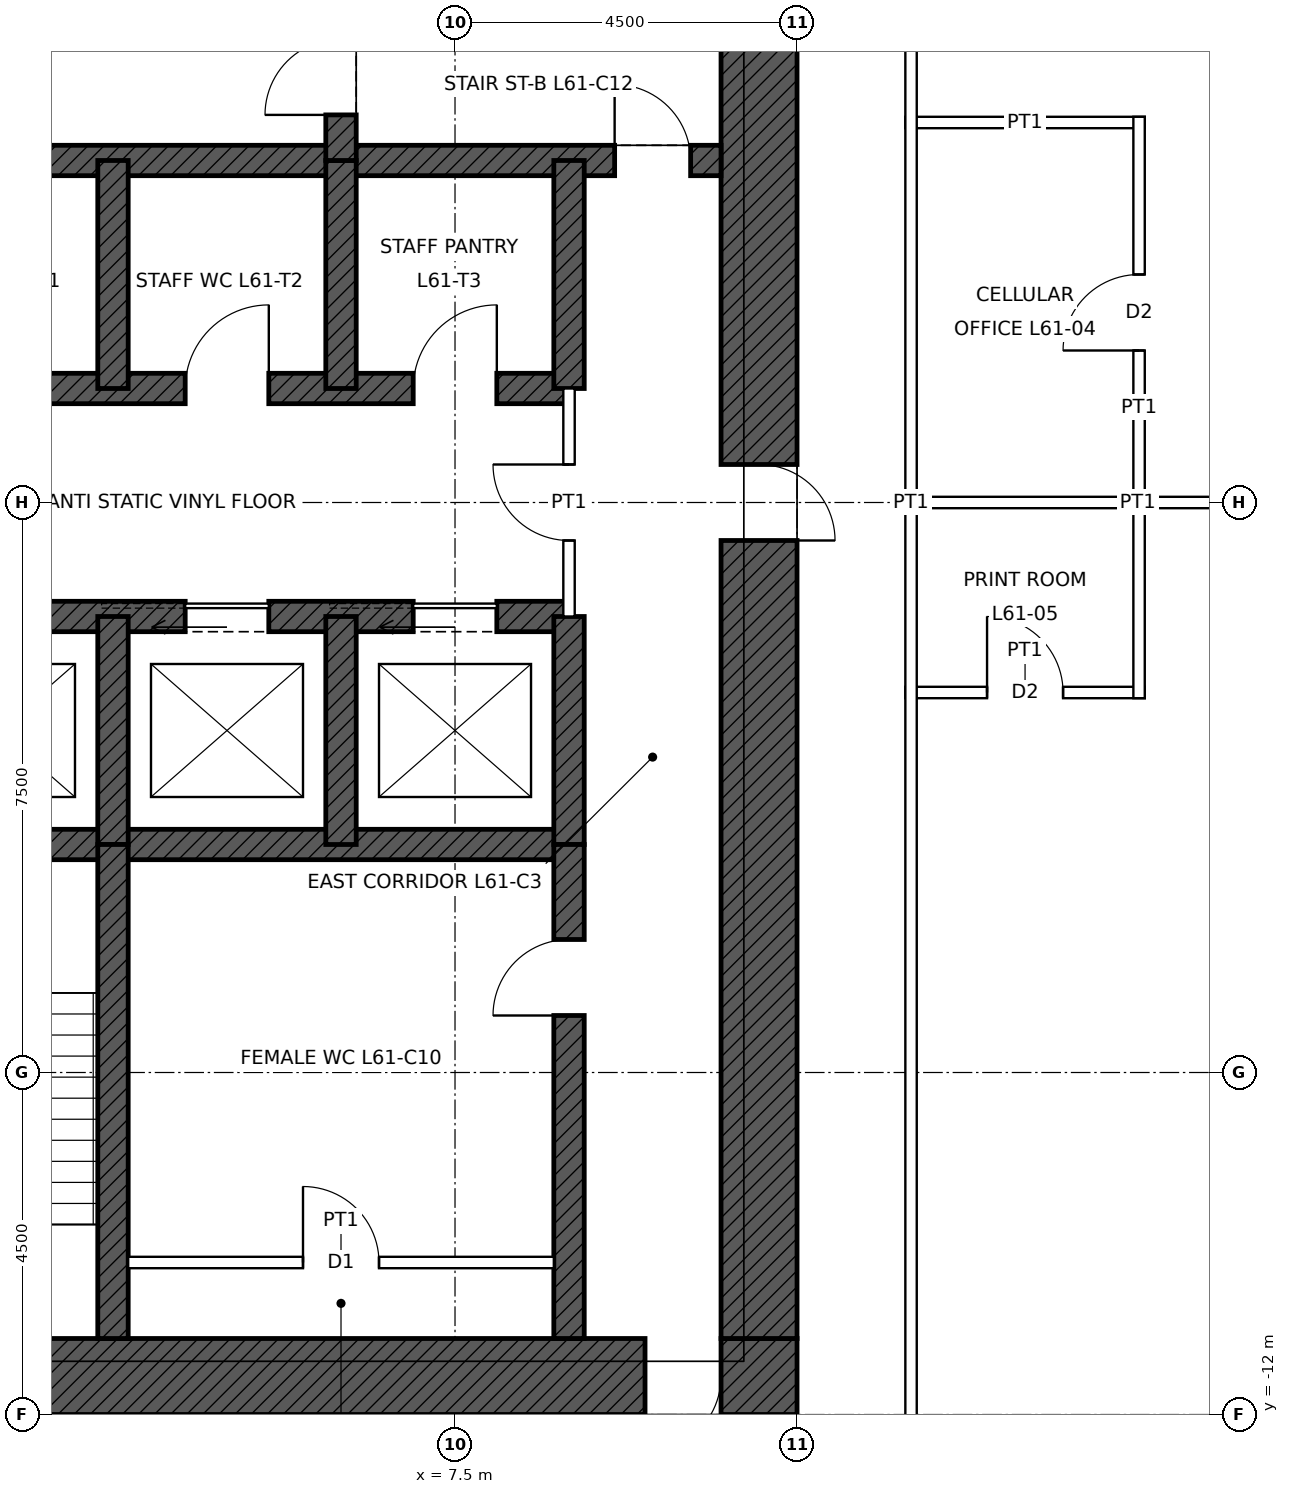
"""IFC4 building model, lengths in metres.
Left out: names, types, materials, properties, quantities, classifications, styles, units other than length and angle.
Written with IfcOpenShell. Run it as: python <this file> out.ifc"""

import sys

from ifc_helpers import new_model, si_unit, direction, frame, frame_2d, origin, place, context, subcontext, project, spatial, rectangle, extrude, element, fill, save


model = new_model("IFC4")
c1 = context("Model", 3, precision=1e-05, world=origin(), true_north=direction((0.0, 1.0)))
c2 = subcontext(c1, "Body", "Model", "MODEL_VIEW")
j1 = project(units=[si_unit("LENGTHUNIT", "METRE"), si_unit("PLANEANGLEUNIT", "RADIAN")], contexts=[c1])
p1 = place(None, origin())
s1 = spatial("IfcSite", under=j1, at=p1, CompositionType="ELEMENT")
p2 = place(p1, origin())
s2 = spatial("IfcBuilding", under=s1, at=p2, CompositionType="ELEMENT")
p3 = place(p2, frame((0.0, 0.0, 279.9)))
s3 = spatial("IfcBuildingStorey", under=s2, at=p3, CompositionType="ELEMENT", Elevation=279.9)
p4 = place(p3, frame((12.0, -11.5, 0.0), z_axis=(0.0, 0.0, 1.0), x_axis=(-1.0, 0.0, 0.0)))
e1 = element("IfcWall", 1, at=p4, inside=s3, PredefinedType="SHEAR", context=c2, shape_type="SweptSolid", body=[
    extrude(rectangle(XDim=24.0, YDim=1.0, at=frame_2d((12.0, 0.0))), origin(), (0.0, 0.0, 1.0), 4.0),
])
p5 = place(p4, frame((11.5, 0.0, 0.0)))
e2 = element("IfcOpeningElement", 2, at=p5, cuts=e1, PredefinedType="OPENING", context=c2, shape_type="SweptSolid", body=[
    extrude(rectangle(XDim=1.0, YDim=2.1, at=frame_2d((0.5, 1.05))), frame((0.0, 0.51, 0.0), z_axis=(0.0, -1.0, 0.0), x_axis=(1.0, 0.0, 0.0)), (0.0, 0.0, 1.0), 1.02),
])
p6 = place(p4, frame((1.0, 0.0, 0.0)))
e3 = element("IfcOpeningElement", 3, at=p6, cuts=e1, PredefinedType="OPENING", context=c2, shape_type="SweptSolid", body=[
    extrude(rectangle(XDim=1.0, YDim=2.4, at=frame_2d((0.5, 1.2))), frame((0.0, 0.51, 0.0), z_axis=(0.0, -1.0, 0.0), x_axis=(1.0, 0.0, 0.0)), (0.0, 0.0, 1.0), 1.02),
])
p7 = place(p3, frame((11.5, 11.0, 0.0), z_axis=(0.0, 0.0, 1.0), x_axis=(0.0, -1.0, 0.0)))
e4 = element("IfcWall", 4, at=p7, inside=s3, PredefinedType="SHEAR", context=c2, shape_type="SweptSolid", body=[
    extrude(rectangle(XDim=22.0, YDim=1.0, at=frame_2d((11.0, 0.0))), origin(), (0.0, 0.0, 1.0), 4.0),
])
p8 = place(p7, frame((10.5, 0.0, 0.0)))
e5 = element("IfcOpeningElement", 5, at=p8, cuts=e4, PredefinedType="OPENING", context=c2, shape_type="SweptSolid", body=[
    extrude(rectangle(XDim=1.0, YDim=2.4, at=frame_2d((0.5, 1.2))), frame((0.0, 0.51, 0.0), z_axis=(0.0, -1.0, 0.0), x_axis=(1.0, 0.0, 0.0)), (0.0, 0.0, 1.0), 1.02),
])
p9 = place(p3, frame((-11.0, 4.5, 0.0), z_axis=(0.0, 0.0, 1.0), x_axis=(1.0, 0.0, 0.0)))
e6 = element("IfcWall", 6, at=p9, inside=s3, PredefinedType="SHEAR", context=c2, shape_type="SweptSolid", body=[
    extrude(rectangle(XDim=22.0, YDim=0.4, at=frame_2d((11.0, 0.0))), origin(), (0.0, 0.0, 1.0), 4.0),
])
p10 = place(p9, frame((0.4, 0.0, 0.0)))
e7 = element("IfcOpeningElement", 7, at=p10, cuts=e6, PredefinedType="OPENING", context=c2, shape_type="SweptSolid", body=[
    extrude(rectangle(XDim=1.0, YDim=2.1, at=frame_2d((0.5, 1.05))), frame((0.0, 0.21, 0.0), z_axis=(0.0, -1.0, 0.0), x_axis=(1.0, 0.0, 0.0)), (0.0, 0.0, 1.0), 0.42),
])
p11 = place(p9, frame((20.6, 0.0, 0.0)))
e8 = element("IfcOpeningElement", 8, at=p11, cuts=e6, PredefinedType="OPENING", context=c2, shape_type="SweptSolid", body=[
    extrude(rectangle(XDim=1.0, YDim=2.1, at=frame_2d((0.5, 1.05))), frame((0.0, 0.21, 0.0), z_axis=(0.0, -1.0, 0.0), x_axis=(1.0, 0.0, 0.0)), (0.0, 0.0, 1.0), 0.42),
])
p12 = place(p3, frame((-9.0, 1.5, 0.0), z_axis=(0.0, 0.0, 1.0), x_axis=(1.0, 0.0, 0.0)))
e9 = element("IfcWall", 9, at=p12, inside=s3, PredefinedType="SHEAR", context=c2, shape_type="SweptSolid", body=[
    extrude(rectangle(XDim=18.0, YDim=0.4, at=frame_2d((9.0, 0.0))), origin(), (0.0, 0.0, 1.0), 4.0),
])
p13 = place(p12, frame((0.95, 0.0, 0.0)))
e10 = element("IfcOpeningElement", 10, at=p13, cuts=e9, PredefinedType="OPENING", context=c2, shape_type="SweptSolid", body=[
    extrude(rectangle(XDim=1.1, YDim=2.1, at=frame_2d((0.55, 1.05))), frame((0.0, 0.21, 0.0), z_axis=(0.0, -1.0, 0.0), x_axis=(1.0, 0.0, 0.0)), (0.0, 0.0, 1.0), 0.42),
])
p14 = place(p12, frame((3.95, 0.0, 0.0)))
e11 = element("IfcOpeningElement", 11, at=p14, cuts=e9, PredefinedType="OPENING", context=c2, shape_type="SweptSolid", body=[
    extrude(rectangle(XDim=1.1, YDim=2.1, at=frame_2d((0.55, 1.05))), frame((0.0, 0.21, 0.0), z_axis=(0.0, -1.0, 0.0), x_axis=(1.0, 0.0, 0.0)), (0.0, 0.0, 1.0), 0.42),
])
p15 = place(p12, frame((6.95, 0.0, 0.0)))
e12 = element("IfcOpeningElement", 12, at=p15, cuts=e9, PredefinedType="OPENING", context=c2, shape_type="SweptSolid", body=[
    extrude(rectangle(XDim=1.1, YDim=2.1, at=frame_2d((0.55, 1.05))), frame((0.0, 0.21, 0.0), z_axis=(0.0, -1.0, 0.0), x_axis=(1.0, 0.0, 0.0)), (0.0, 0.0, 1.0), 0.42),
])
p16 = place(p12, frame((9.95, 0.0, 0.0)))
e13 = element("IfcOpeningElement", 13, at=p16, cuts=e9, PredefinedType="OPENING", context=c2, shape_type="SweptSolid", body=[
    extrude(rectangle(XDim=1.1, YDim=2.1, at=frame_2d((0.55, 1.05))), frame((0.0, 0.21, 0.0), z_axis=(0.0, -1.0, 0.0), x_axis=(1.0, 0.0, 0.0)), (0.0, 0.0, 1.0), 0.42),
])
p17 = place(p12, frame((12.95, 0.0, 0.0)))
e14 = element("IfcOpeningElement", 14, at=p17, cuts=e9, PredefinedType="OPENING", context=c2, shape_type="SweptSolid", body=[
    extrude(rectangle(XDim=1.1, YDim=2.1, at=frame_2d((0.55, 1.05))), frame((0.0, 0.21, 0.0), z_axis=(0.0, -1.0, 0.0), x_axis=(1.0, 0.0, 0.0)), (0.0, 0.0, 1.0), 0.42),
])
p18 = place(p12, frame((15.95, 0.0, 0.0)))
e15 = element("IfcOpeningElement", 15, at=p18, cuts=e9, PredefinedType="OPENING", context=c2, shape_type="SweptSolid", body=[
    extrude(rectangle(XDim=1.1, YDim=2.1, at=frame_2d((0.55, 1.05))), frame((0.0, 0.21, 0.0), z_axis=(0.0, -1.0, 0.0), x_axis=(1.0, 0.0, 0.0)), (0.0, 0.0, 1.0), 0.42),
])
p19 = place(p3, frame((-9.0, -1.5, 0.0), z_axis=(0.0, 0.0, 1.0), x_axis=(1.0, 0.0, 0.0)))
e16 = element("IfcWall", 16, at=p19, inside=s3, PredefinedType="SHEAR", context=c2, shape_type="SweptSolid", body=[
    extrude(rectangle(XDim=18.0, YDim=0.4, at=frame_2d((9.0, 0.0))), origin(), (0.0, 0.0, 1.0), 4.0),
])
p20 = place(p19, frame((9.95, 0.0, 0.0)))
e17 = element("IfcOpeningElement", 17, at=p20, cuts=e16, PredefinedType="OPENING", context=c2, shape_type="SweptSolid", body=[
    extrude(rectangle(XDim=1.1, YDim=2.1, at=frame_2d((0.55, 1.05))), frame((0.0, 0.21, 0.0), z_axis=(0.0, -1.0, 0.0), x_axis=(1.0, 0.0, 0.0)), (0.0, 0.0, 1.0), 0.42),
])
p21 = place(p19, frame((12.95, 0.0, 0.0)))
e18 = element("IfcOpeningElement", 18, at=p21, cuts=e16, PredefinedType="OPENING", context=c2, shape_type="SweptSolid", body=[
    extrude(rectangle(XDim=1.1, YDim=2.1, at=frame_2d((0.55, 1.05))), frame((0.0, 0.21, 0.0), z_axis=(0.0, -1.0, 0.0), x_axis=(1.0, 0.0, 0.0)), (0.0, 0.0, 1.0), 0.42),
])
p22 = place(p19, frame((15.95, 0.0, 0.0)))
e19 = element("IfcOpeningElement", 19, at=p22, cuts=e16, PredefinedType="OPENING", context=c2, shape_type="SweptSolid", body=[
    extrude(rectangle(XDim=1.1, YDim=2.1, at=frame_2d((0.55, 1.05))), frame((0.0, 0.21, 0.0), z_axis=(0.0, -1.0, 0.0), x_axis=(1.0, 0.0, 0.0)), (0.0, 0.0, 1.0), 0.42),
])
p23 = place(p19, frame((0.95, 0.0, 0.0)))
e20 = element("IfcOpeningElement", 20, at=p23, cuts=e16, PredefinedType="OPENING", context=c2, shape_type="SweptSolid", body=[
    extrude(rectangle(XDim=1.1, YDim=2.1, at=frame_2d((0.55, 1.05))), frame((0.0, 0.21, 0.0), z_axis=(0.0, -1.0, 0.0), x_axis=(1.0, 0.0, 0.0)), (0.0, 0.0, 1.0), 0.42),
])
p24 = place(p19, frame((3.95, 0.0, 0.0)))
e21 = element("IfcOpeningElement", 21, at=p24, cuts=e16, PredefinedType="OPENING", context=c2, shape_type="SweptSolid", body=[
    extrude(rectangle(XDim=1.1, YDim=2.1, at=frame_2d((0.55, 1.05))), frame((0.0, 0.21, 0.0), z_axis=(0.0, -1.0, 0.0), x_axis=(1.0, 0.0, 0.0)), (0.0, 0.0, 1.0), 0.42),
])
p25 = place(p19, frame((6.95, 0.0, 0.0)))
e22 = element("IfcOpeningElement", 22, at=p25, cuts=e16, PredefinedType="OPENING", context=c2, shape_type="SweptSolid", body=[
    extrude(rectangle(XDim=1.1, YDim=2.1, at=frame_2d((0.55, 1.05))), frame((0.0, 0.21, 0.0), z_axis=(0.0, -1.0, 0.0), x_axis=(1.0, 0.0, 0.0)), (0.0, 0.0, 1.0), 0.42),
])
p26 = place(p3, frame((-9.0, -4.5, 0.0), z_axis=(0.0, 0.0, 1.0), x_axis=(1.0, 0.0, 0.0)))
e23 = element("IfcWall", 23, at=p26, inside=s3, PredefinedType="SHEAR", context=c2, shape_type="SweptSolid", body=[
    extrude(rectangle(XDim=18.0, YDim=0.4, at=frame_2d((9.0, 0.0))), origin(), (0.0, 0.0, 1.0), 4.0),
])
for number, where, z_axis, x_axis in (
    (24, (9.0, 1.5, 0.0), (0.0, 0.0, 1.0), (0.0, 1.0, 0.0)),
    (25, (9.0, -4.5, 0.0), (0.0, 0.0, 1.0), (0.0, 1.0, 0.0)),
    (26, (3.0, 1.5, 0.0), (0.0, 0.0, 1.0), (0.0, 1.0, 0.0)),
    (27, (6.0, 1.5, 0.0), (0.0, 0.0, 1.0), (0.0, 1.0, 0.0)),
    (28, (3.0, -4.5, 0.0), (0.0, 0.0, 1.0), (0.0, 1.0, 0.0)),
    (29, (6.0, -4.5, 0.0), (0.0, 0.0, 1.0), (0.0, 1.0, 0.0)),
):
    element("IfcWall", number, at=place(p3, frame(where, z_axis=z_axis, x_axis=x_axis)), inside=s3, PredefinedType="SHEAR", context=c2, shape_type="SweptSolid", body=[
        extrude(rectangle(XDim=3.0, YDim=0.4, at=frame_2d((1.5, 0.0))), origin(), (0.0, 0.0, 1.0), 4.0),
    ])
p27 = place(p3, frame((6.0, 4.5, 0.0), z_axis=(0.0, 0.0, 1.0), x_axis=(0.0, 1.0, 0.0)))
e30 = element("IfcWall", 30, at=p27, inside=s3, PredefinedType="SHEAR", context=c2, shape_type="SweptSolid", body=[
    extrude(rectangle(XDim=6.5, YDim=0.4, at=frame_2d((3.25, 0.0))), origin(), (0.0, 0.0, 1.0), 4.0),
])
p28 = place(p27, frame((0.6, 0.0, 0.0)))
e31 = element("IfcOpeningElement", 31, at=p28, cuts=e30, PredefinedType="OPENING", context=c2, shape_type="SweptSolid", body=[
    extrude(rectangle(XDim=1.0, YDim=2.1, at=frame_2d((0.5, 1.05))), frame((0.0, 0.21, 0.0), z_axis=(0.0, -1.0, 0.0), x_axis=(1.0, 0.0, 0.0)), (0.0, 0.0, 1.0), 0.42),
])
p29 = place(p3, frame((9.0, -11.0, 0.0), z_axis=(0.0, 0.0, 1.0), x_axis=(0.0, 1.0, 0.0)))
e32 = element("IfcWall", 32, at=p29, inside=s3, PredefinedType="SHEAR", context=c2, shape_type="SweptSolid", body=[
    extrude(rectangle(XDim=6.5, YDim=0.4, at=frame_2d((3.25, 0.0))), origin(), (0.0, 0.0, 1.0), 4.0),
])
p30 = place(p29, frame((4.25, 0.0, 0.0)))
e33 = element("IfcOpeningElement", 33, at=p30, cuts=e32, PredefinedType="OPENING", context=c2, shape_type="SweptSolid", body=[
    extrude(rectangle(XDim=1.0, YDim=2.1, at=frame_2d((0.5, 1.05))), frame((0.0, 0.21, 0.0), z_axis=(0.0, -1.0, 0.0), x_axis=(1.0, 0.0, 0.0)), (0.0, 0.0, 1.0), 0.42),
])
p31 = place(p3, frame((3.0, -11.0, 0.0), z_axis=(0.0, 0.0, 1.0), x_axis=(0.0, 1.0, 0.0)))
e34 = element("IfcWall", 34, at=p31, inside=s3, PredefinedType="SHEAR", context=c2, shape_type="SweptSolid", body=[
    extrude(rectangle(XDim=6.5, YDim=0.4, at=frame_2d((3.25, 0.0))), origin(), (0.0, 0.0, 1.0), 4.0),
])
p32 = place(p3, frame((13.425, -2.5, 0.0), z_axis=(0.0, 0.0, 1.0), x_axis=(1.0, 0.0, 0.0)))
e35 = element("IfcWall", 35, at=p32, inside=s3, PredefinedType="PARTITIONING", context=c2, shape_type="SweptSolid", body=[
    extrude(rectangle(XDim=3.15, YDim=0.15, at=frame_2d((1.575, 0.0))), origin(), (0.0, 0.0, 1.0), 3.85),
])
p33 = place(p32, frame((1.075, 0.0, 0.0)))
e36 = element("IfcOpeningElement", 36, at=p33, cuts=e35, PredefinedType="OPENING", context=c2, shape_type="SweptSolid", body=[
    extrude(rectangle(XDim=1.0, YDim=2.1, at=frame_2d((0.5, 1.05))), frame((0.0, 0.085, 0.0), z_axis=(0.0, -1.0, 0.0), x_axis=(1.0, 0.0, 0.0)), (0.0, 0.0, 1.0), 0.17),
])
p34 = place(p3, frame((13.425, 0.0, 0.0), z_axis=(0.0, 0.0, 1.0), x_axis=(1.0, 0.0, 0.0)))
e37 = element("IfcWall", 37, at=p34, inside=s3, PredefinedType="PARTITIONING", context=c2, shape_type="SweptSolid", body=[
    extrude(rectangle(XDim=6.115, YDim=0.15, at=frame_2d((3.058, 0.0))), origin(), (0.0, 0.0, 1.0), 3.243),
])
p35 = place(p3, frame((13.425, 5.0, 0.0), z_axis=(0.0, 0.0, 1.0), x_axis=(1.0, 0.0, 0.0)))
e38 = element("IfcWall", 38, at=p35, inside=s3, PredefinedType="PARTITIONING", context=c2, shape_type="SweptSolid", body=[
    extrude(rectangle(XDim=3.15, YDim=0.15, at=frame_2d((1.575, 0.0))), origin(), (0.0, 0.0, 1.0), 3.85),
])
p36 = place(p3, frame((13.5, -13.575, 0.0), z_axis=(0.0, 0.0, 1.0), x_axis=(0.0, 1.0, 0.0)))
e39 = element("IfcWall", 39, at=p36, inside=s3, PredefinedType="PARTITIONING", context=c2, shape_type="SweptSolid", body=[
    extrude(rectangle(XDim=27.15, YDim=0.15, at=frame_2d((13.575, 0.0))), origin(), (0.0, 0.0, 1.0), 3.85),
])
p37 = place(p3, frame((16.5, -2.575, 0.0), z_axis=(0.0, 0.0, 1.0), x_axis=(0.0, 1.0, 0.0)))
e40 = element("IfcWall", 40, at=p37, inside=s3, PredefinedType="PARTITIONING", context=c2, shape_type="SweptSolid", body=[
    extrude(rectangle(XDim=7.65, YDim=0.15, at=frame_2d((3.825, 0.0))), origin(), (0.0, 0.0, 1.0), 3.85),
])
p38 = place(p37, frame((4.575, 0.0, 0.0)))
e41 = element("IfcOpeningElement", 41, at=p38, cuts=e40, PredefinedType="OPENING", context=c2, shape_type="SweptSolid", body=[
    extrude(rectangle(XDim=1.0, YDim=2.1, at=frame_2d((0.5, 1.05))), frame((0.0, 0.085, 0.0), z_axis=(0.0, -1.0, 0.0), x_axis=(1.0, 0.0, 0.0)), (0.0, 0.0, 1.0), 0.17),
])
p39 = place(p3, frame((3.2, -10.0, 0.0), z_axis=(0.0, 0.0, 1.0), x_axis=(1.0, 0.0, 0.0)))
e42 = element("IfcWall", 42, at=p39, inside=s3, PredefinedType="PARTITIONING", context=c2, shape_type="SweptSolid", body=[
    extrude(rectangle(XDim=5.6, YDim=0.15, at=frame_2d((2.8, 0.0))), origin(), (0.0, 0.0, 1.0), 3.75),
])
p40 = place(p39, frame((2.3, 0.0, 0.0)))
e43 = element("IfcOpeningElement", 43, at=p40, cuts=e42, PredefinedType="OPENING", context=c2, shape_type="SweptSolid", body=[
    extrude(rectangle(XDim=1.0, YDim=2.1, at=frame_2d((0.5, 1.05))), frame((0.0, 0.085, 0.0), z_axis=(0.0, -1.0, 0.0), x_axis=(1.0, 0.0, 0.0)), (0.0, 0.0, 1.0), 0.17),
])
p41 = place(p3, frame((9.0, -1.5, 0.0), z_axis=(0.0, 0.0, 1.0), x_axis=(0.0, 1.0, 0.0)))
e44 = element("IfcWall", 44, at=p41, inside=s3, PredefinedType="PARTITIONING", context=c2, shape_type="SweptSolid", body=[
    extrude(rectangle(XDim=3.0, YDim=0.15, at=frame_2d((1.5, 0.0))), origin(), (0.0, 0.0, 1.0), 3.75),
])
p42 = place(p41, frame((1.0, 0.0, 0.0)))
e45 = element("IfcOpeningElement", 45, at=p42, cuts=e44, PredefinedType="OPENING", context=c2, shape_type="SweptSolid", body=[
    extrude(rectangle(XDim=1.0, YDim=2.4, at=frame_2d((0.5, 1.2))), frame((0.0, 0.085, 0.0), z_axis=(0.0, -1.0, 0.0), x_axis=(1.0, 0.0, 0.0)), (0.0, 0.0, 1.0), 0.17),
])
p43 = place(p11, origin())
e46 = element("IfcDoor", 46, at=p43, inside=s3, OperationType="SINGLE_SWING_LEFT", PredefinedType="DOOR", context=c2, shape_type="SweptSolid", body=[
    extrude(rectangle(XDim=1.0, YDim=2.1, at=frame_2d((0.5, 1.05))), frame((0.0, 0.025, 0.0), z_axis=(0.0, -1.0, 0.0), x_axis=(1.0, 0.0, 0.0)), (0.0, 0.0, 1.0), 0.05),
])
fill(e8, e46)
p44 = place(p28, origin())
e47 = element("IfcDoor", 47, at=p44, inside=s3, OperationType="SINGLE_SWING_LEFT", PredefinedType="DOOR", context=c2, shape_type="SweptSolid", body=[
    extrude(rectangle(XDim=1.0, YDim=2.1, at=frame_2d((0.5, 1.05))), frame((0.0, 0.025, 0.0), z_axis=(0.0, -1.0, 0.0), x_axis=(1.0, 0.0, 0.0)), (0.0, 0.0, 1.0), 0.05),
])
fill(e31, e47)
p45 = place(p8, origin())
e48 = element("IfcDoor", 48, at=p45, inside=s3, OperationType="SINGLE_SWING_RIGHT", PredefinedType="DOOR", context=c2, shape_type="SweptSolid", body=[
    extrude(rectangle(XDim=1.0, YDim=2.4, at=frame_2d((0.5, 1.2))), frame((0.0, 0.485, 0.0), z_axis=(0.0, -1.0, 0.0), x_axis=(1.0, 0.0, 0.0)), (0.0, 0.0, 1.0), 0.05),
])
fill(e5, e48)
p46 = place(p6, origin())
e49 = element("IfcDoor", 49, at=p46, inside=s3, OperationType="SINGLE_SWING_RIGHT", PredefinedType="DOOR", context=c2, shape_type="SweptSolid", body=[
    extrude(rectangle(XDim=1.0, YDim=2.4, at=frame_2d((0.5, 1.2))), frame((0.0, 0.485, 0.0), z_axis=(0.0, -1.0, 0.0), x_axis=(1.0, 0.0, 0.0)), (0.0, 0.0, 1.0), 0.05),
])
fill(e3, e49)
p47 = place(p30, origin())
e50 = element("IfcDoor", 50, at=p47, inside=s3, OperationType="SINGLE_SWING_LEFT", PredefinedType="DOOR", context=c2, shape_type="SweptSolid", body=[
    extrude(rectangle(XDim=1.0, YDim=2.1, at=frame_2d((0.5, 1.05))), frame((0.0, 0.025, 0.0), z_axis=(0.0, -1.0, 0.0), x_axis=(1.0, 0.0, 0.0)), (0.0, 0.0, 1.0), 0.05),
])
fill(e33, e50)
p48 = place(p21, origin())
e51 = element("IfcDoor", 51, at=p48, inside=s3, OperationType="SLIDING_TO_LEFT", PredefinedType="DOOR", context=c2, shape_type="SweptSolid", body=[
    extrude(rectangle(XDim=1.1, YDim=2.1, at=frame_2d((0.55, 1.05))), frame((0.0, 0.025, 0.0), z_axis=(0.0, -1.0, 0.0), x_axis=(1.0, 0.0, 0.0)), (0.0, 0.0, 1.0), 0.05),
])
fill(e18, e51)
p49 = place(p22, origin())
e52 = element("IfcDoor", 52, at=p49, inside=s3, OperationType="SLIDING_TO_LEFT", PredefinedType="DOOR", context=c2, shape_type="SweptSolid", body=[
    extrude(rectangle(XDim=1.1, YDim=2.1, at=frame_2d((0.55, 1.05))), frame((0.0, 0.025, 0.0), z_axis=(0.0, -1.0, 0.0), x_axis=(1.0, 0.0, 0.0)), (0.0, 0.0, 1.0), 0.05),
])
fill(e19, e52)
p50 = place(p40, origin())
e53 = element("IfcDoor", 53, at=p50, inside=s3, OperationType="SINGLE_SWING_LEFT", PredefinedType="DOOR", context=c2, shape_type="SweptSolid", body=[
    extrude(rectangle(XDim=1.0, YDim=2.1, at=frame_2d((0.5, 1.05))), frame((0.0, 0.025, 0.0), z_axis=(0.0, -1.0, 0.0), x_axis=(1.0, 0.0, 0.0)), (0.0, 0.0, 1.0), 0.05),
])
fill(e43, e53)
p51 = place(p42, origin())
e54 = element("IfcDoor", 54, at=p51, inside=s3, OperationType="SINGLE_SWING_RIGHT", PredefinedType="DOOR", context=c2, shape_type="SweptSolid", body=[
    extrude(rectangle(XDim=1.0, YDim=2.4, at=frame_2d((0.5, 1.2))), frame((0.0, 0.025, 0.0), z_axis=(0.0, -1.0, 0.0), x_axis=(1.0, 0.0, 0.0)), (0.0, 0.0, 1.0), 0.05),
])
fill(e45, e54)
p52 = place(p17, origin())
e55 = element("IfcDoor", 55, at=p52, inside=s3, OperationType="SINGLE_SWING_RIGHT", PredefinedType="DOOR", context=c2, shape_type="SweptSolid", body=[
    extrude(rectangle(XDim=1.1, YDim=2.1, at=frame_2d((0.55, 1.05))), frame((0.0, 0.025, 0.0), z_axis=(0.0, -1.0, 0.0), x_axis=(1.0, 0.0, 0.0)), (0.0, 0.0, 1.0), 0.05),
])
fill(e14, e55)
p53 = place(p18, origin())
e56 = element("IfcDoor", 56, at=p53, inside=s3, OperationType="SINGLE_SWING_RIGHT", PredefinedType="DOOR", context=c2, shape_type="SweptSolid", body=[
    extrude(rectangle(XDim=1.1, YDim=2.1, at=frame_2d((0.55, 1.05))), frame((0.0, 0.025, 0.0), z_axis=(0.0, -1.0, 0.0), x_axis=(1.0, 0.0, 0.0)), (0.0, 0.0, 1.0), 0.05),
])
fill(e15, e56)
p54 = place(p38, origin())
e57 = element("IfcDoor", 57, at=p54, inside=s3, OperationType="SINGLE_SWING_LEFT", PredefinedType="DOOR", context=c2, shape_type="SweptSolid", body=[
    extrude(rectangle(XDim=1.0, YDim=2.1, at=frame_2d((0.5, 1.05))), frame((0.0, 0.025, 0.0), z_axis=(0.0, -1.0, 0.0), x_axis=(1.0, 0.0, 0.0)), (0.0, 0.0, 1.0), 0.05),
])
fill(e41, e57)
p55 = place(p33, origin())
e58 = element("IfcDoor", 58, at=p55, inside=s3, OperationType="SINGLE_SWING_LEFT", PredefinedType="DOOR", context=c2, shape_type="SweptSolid", body=[
    extrude(rectangle(XDim=1.0, YDim=2.1, at=frame_2d((0.5, 1.05))), frame((0.0, 0.025, 0.0), z_axis=(0.0, -1.0, 0.0), x_axis=(1.0, 0.0, 0.0)), (0.0, 0.0, 1.0), 0.05),
])
fill(e36, e58)
save(model, sys.argv[1])
